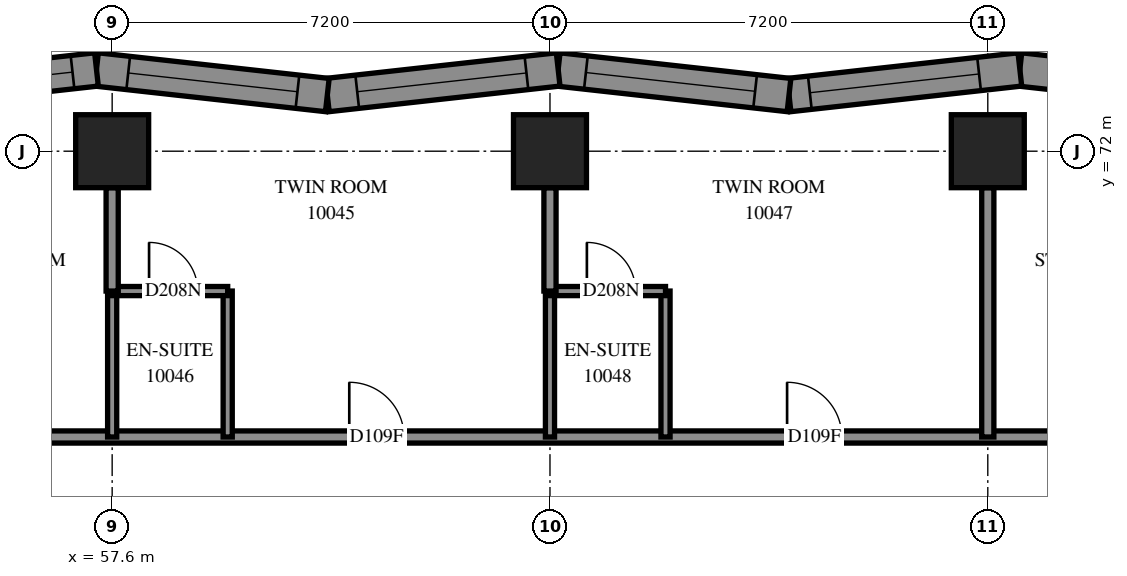
"""IFC4 building model, lengths in metres.
Left out: names, types, materials, properties, quantities, classifications, styles, units other than length and angle.
Written with IfcOpenShell. Run it as: python <this file> out.ifc"""

import sys

from ifc_helpers import new_model, si_unit, direction, frame, frame_2d, origin, origin_2d, place, context, subcontext, project, spatial, polyline, rectangle, outline, extrude, element, fill, save


model = new_model("IFC4")
c1 = context("Model", 3, precision=1e-05, world=origin(), true_north=direction((0.0, 1.0)))
c2 = subcontext(c1, "Body", "Model", "MODEL_VIEW")
j1 = project(units=[si_unit("LENGTHUNIT", "METRE"), si_unit("PLANEANGLEUNIT", "RADIAN")], contexts=[c1])
p1 = place(None, origin())
s1 = spatial("IfcSite", under=j1, at=p1, CompositionType="ELEMENT")
p2 = place(p1, origin())
s2 = spatial("IfcBuilding", under=s1, at=p2, CompositionType="ELEMENT")
p3 = place(p2, frame((0.0, 0.0, 40.6)))
s3 = spatial("IfcBuildingStorey", under=s2, at=p3, CompositionType="ELEMENT", Elevation=40.6)
for number, where, z_axis, x_axis in (
    (1, (57.6, 72.0, 0.0), (0.0, 0.0, 1.0), (1.0, 0.0, 0.0)),
    (2, (64.8, 72.0, 0.0), (0.0, 0.0, 1.0), (1.0, 0.0, 0.0)),
    (3, (72.0, 72.0, 0.0), (0.0, 0.0, 1.0), (1.0, 0.0, 0.0)),
):
    element("IfcColumn", number, at=place(p3, frame(where, z_axis=z_axis, x_axis=x_axis)), inside=s3, PredefinedType="COLUMN", context=c2, shape_type="SweptSolid", body=[
        extrude(rectangle(XDim=1.2, YDim=1.2, at=origin_2d()), origin(), (0.0, 0.0, 1.0), 3.1),
    ])
p4 = place(p3, frame((76.345, 72.921, 0.0), z_axis=(0.0, 0.0, 1.0), x_axis=(-0.9939087915, 0.1102057815, 0.0)))
e4 = element("IfcWall", 4, at=p4, inside=s3, PredefinedType="SOLIDWALL", context=c2, shape_type="SweptSolid", body=[
    extrude(outline(polyline([(0.052, -0.275), (3.872, -0.275), (3.811, 0.275), (-0.052, 0.275), (0.052, -0.275)])), origin(), (0.0, 0.0, 1.0), 3.1),
])
p5 = place(p4, frame((1.58, 0.0, 0.5)))
e5 = element("IfcOpeningElement", 5, at=p5, cuts=e4, PredefinedType="OPENING", context=c2, shape_type="SweptSolid", body=[
    extrude(rectangle(XDim=1.2, YDim=2.45, at=frame_2d((0.6, 1.225))), frame((0.0, 0.285, 0.0), z_axis=(0.0, -1.0, 0.0), x_axis=(1.0, 0.0, 0.0)), (0.0, 0.0, 1.0), 0.57),
])
p6 = place(p3, frame((72.527, 73.344, 0.0), z_axis=(0.0, 0.0, 1.0), x_axis=(-0.99390702, -0.1102217568, 0.0)))
e6 = element("IfcWall", 6, at=p6, inside=s3, PredefinedType="SOLIDWALL", context=c2, shape_type="SweptSolid", body=[
    extrude(outline(polyline([(-0.03, -0.275), (3.789, -0.275), (3.85, 0.275), (0.03, 0.275), (-0.03, -0.275)])), origin(), (0.0, 0.0, 1.0), 3.1),
])
p7 = place(p6, frame((0.675, 0.0, 0.5)))
e7 = element("IfcOpeningElement", 7, at=p7, cuts=e6, PredefinedType="OPENING", context=c2, shape_type="SweptSolid", body=[
    extrude(rectangle(XDim=2.8, YDim=2.45, at=frame_2d((1.4, 1.225))), frame((0.0, 0.285, 0.0), z_axis=(0.0, -1.0, 0.0), x_axis=(1.0, 0.0, 0.0)), (0.0, 0.0, 1.0), 0.57),
])
p8 = place(p3, frame((68.731, 72.923, 0.0), z_axis=(0.0, 0.0, 1.0), x_axis=(-0.99390702, 0.1102217568, 0.0)))
e8 = element("IfcWall", 8, at=p8, inside=s3, PredefinedType="SOLIDWALL", context=c2, shape_type="SweptSolid", body=[
    extrude(outline(polyline([(0.03, -0.275), (3.85, -0.275), (3.789, 0.275), (-0.03, 0.275), (0.03, -0.275)])), origin(), (0.0, 0.0, 1.0), 3.1),
])
p9 = place(p8, frame((0.561, 0.0, 0.5)))
e9 = element("IfcOpeningElement", 9, at=p9, cuts=e8, PredefinedType="OPENING", context=c2, shape_type="SweptSolid", body=[
    extrude(rectangle(XDim=2.8, YDim=2.45, at=frame_2d((1.4, 1.225))), frame((0.0, 0.285, 0.0), z_axis=(0.0, -1.0, 0.0), x_axis=(1.0, 0.0, 0.0)), (0.0, 0.0, 1.0), 0.57),
])
p10 = place(p3, frame((64.935, 73.344, 0.0), z_axis=(0.0, 0.0, 1.0), x_axis=(-0.993907338, -0.1102188888, 0.0)))
e10 = element("IfcWall", 10, at=p10, inside=s3, PredefinedType="SOLIDWALL", context=c2, shape_type="SweptSolid", body=[
    extrude(outline(polyline([(-0.03, -0.275), (3.789, -0.275), (3.85, 0.275), (0.03, 0.275), (-0.03, -0.275)])), origin(), (0.0, 0.0, 1.0), 3.1),
])
p11 = place(p10, frame((0.525, 0.0, 0.5)))
e11 = element("IfcOpeningElement", 11, at=p11, cuts=e10, PredefinedType="OPENING", context=c2, shape_type="SweptSolid", body=[
    extrude(rectangle(XDim=2.8, YDim=2.45, at=frame_2d((1.4, 1.225))), frame((0.0, 0.285, 0.0), z_axis=(0.0, -1.0, 0.0), x_axis=(1.0, 0.0, 0.0)), (0.0, 0.0, 1.0), 0.57),
])
p12 = place(p3, frame((61.138, 72.923, 0.0), z_axis=(0.0, 0.0, 1.0), x_axis=(-0.99390702, 0.1102217568, 0.0)))
e12 = element("IfcWall", 12, at=p12, inside=s3, PredefinedType="SOLIDWALL", context=c2, shape_type="SweptSolid", body=[
    extrude(outline(polyline([(0.03, -0.275), (3.85, -0.275), (3.789, 0.275), (-0.03, 0.275), (0.03, -0.275)])), origin(), (0.0, 0.0, 1.0), 3.1),
])
p13 = place(p12, frame((0.494, 0.0, 0.5)))
e13 = element("IfcOpeningElement", 13, at=p13, cuts=e12, PredefinedType="OPENING", context=c2, shape_type="SweptSolid", body=[
    extrude(rectangle(XDim=2.8, YDim=2.45, at=frame_2d((1.4, 1.225))), frame((0.0, 0.285, 0.0), z_axis=(0.0, -1.0, 0.0), x_axis=(1.0, 0.0, 0.0)), (0.0, 0.0, 1.0), 0.57),
])
p14 = place(p3, frame((57.342, 73.344, 0.0), z_axis=(0.0, 0.0, 1.0), x_axis=(-0.99390702, -0.1102217568, 0.0)))
e14 = element("IfcWall", 14, at=p14, inside=s3, PredefinedType="SOLIDWALL", context=c2, shape_type="SweptSolid", body=[
    extrude(outline(polyline([(-0.03, -0.275), (3.789, -0.275), (3.85, 0.275), (0.03, 0.275), (-0.03, -0.275)])), origin(), (0.0, 0.0, 1.0), 3.1),
])
p15 = place(p14, frame((0.397, 0.0, 0.5)))
e15 = element("IfcOpeningElement", 15, at=p15, cuts=e14, PredefinedType="OPENING", context=c2, shape_type="SweptSolid", body=[
    extrude(rectangle(XDim=2.8, YDim=2.45, at=frame_2d((1.4, 1.225))), frame((0.0, 0.285, 0.0), z_axis=(0.0, -1.0, 0.0), x_axis=(1.0, 0.0, 0.0)), (0.0, 0.0, 1.0), 0.57),
])
p16 = place(p3, frame((55.1, 67.3, 0.0), z_axis=(0.0, 0.0, 1.0), x_axis=(1.0, 0.0, 0.0)))
e16 = element("IfcWall", 16, at=p16, inside=s3, PredefinedType="PARTITIONING", context=c2, shape_type="SweptSolid", body=[
    extrude(rectangle(XDim=19.4, YDim=0.2, at=frame_2d((9.7, 0.0))), origin(), (0.0, 0.0, 1.0), 3.1),
])
p17 = place(p16, frame((6.399, 0.0, 0.0)))
e17 = element("IfcOpeningElement", 17, at=p17, cuts=e16, PredefinedType="OPENING", context=c2, shape_type="SweptSolid", body=[
    extrude(rectangle(XDim=0.9, YDim=2.1, at=frame_2d((0.45, 1.05))), frame((0.0, 0.11, 0.0), z_axis=(0.0, -1.0, 0.0), x_axis=(1.0, 0.0, 0.0)), (0.0, 0.0, 1.0), 0.22),
])
p18 = place(p16, frame((13.599, 0.0, 0.0)))
e18 = element("IfcOpeningElement", 18, at=p18, cuts=e16, PredefinedType="OPENING", context=c2, shape_type="SweptSolid", body=[
    extrude(rectangle(XDim=0.9, YDim=2.1, at=frame_2d((0.45, 1.05))), frame((0.0, 0.11, 0.0), z_axis=(0.0, -1.0, 0.0), x_axis=(1.0, 0.0, 0.0)), (0.0, 0.0, 1.0), 0.22),
])
p19 = place(p3, frame((72.0, 67.3, 0.0), z_axis=(0.0, 0.0, 1.0), x_axis=(0.0, 1.0, 0.0)))
e19 = element("IfcWall", 19, at=p19, inside=s3, PredefinedType="PARTITIONING", context=c2, shape_type="SweptSolid", body=[
    extrude(rectangle(XDim=4.1, YDim=0.2, at=frame_2d((2.05, 0.0))), origin(), (0.0, 0.0, 1.0), 3.1),
])
for number, where, z_axis, x_axis in (
    (20, (59.5, 67.3, 0.0), (0.0, 0.0, 1.0), (0.0, 1.0, 0.0)),
    (21, (57.6, 67.3, 0.0), (0.0, 0.0, 1.0), (0.0, 1.0, 0.0)),
    (22, (66.7, 67.3, 0.0), (0.0, 0.0, 1.0), (0.0, 1.0, 0.0)),
    (23, (64.8, 67.3, 0.0), (0.0, 0.0, 1.0), (0.0, 1.0, 0.0)),
):
    element("IfcWall", number, at=place(p3, frame(where, z_axis=z_axis, x_axis=x_axis)), inside=s3, PredefinedType="PARTITIONING", context=c2, shape_type="SweptSolid", body=[
        extrude(rectangle(XDim=2.4, YDim=0.15, at=frame_2d((1.2, 0.0))), origin(), (0.0, 0.0, 1.0), 3.1),
    ])
p20 = place(p3, frame((64.8, 69.7, 0.0), z_axis=(0.0, 0.0, 1.0), x_axis=(1.0, 0.0, 0.0)))
e24 = element("IfcWall", 24, at=p20, inside=s3, PredefinedType="PARTITIONING", context=c2, shape_type="SweptSolid", body=[
    extrude(rectangle(XDim=1.9, YDim=0.15, at=frame_2d((0.95, 0.0))), origin(), (0.0, 0.0, 1.0), 3.1),
])
p21 = place(p20, frame((0.607, 0.0, 0.0)))
e25 = element("IfcOpeningElement", 25, at=p21, cuts=e24, PredefinedType="OPENING", context=c2, shape_type="SweptSolid", body=[
    extrude(rectangle(XDim=0.8, YDim=2.1, at=frame_2d((0.4, 1.05))), frame((0.0, 0.085, 0.0), z_axis=(0.0, -1.0, 0.0), x_axis=(1.0, 0.0, 0.0)), (0.0, 0.0, 1.0), 0.17),
])
p22 = place(p3, frame((57.6, 69.7, 0.0), z_axis=(0.0, 0.0, 1.0), x_axis=(1.0, 0.0, 0.0)))
e26 = element("IfcWall", 26, at=p22, inside=s3, PredefinedType="PARTITIONING", context=c2, shape_type="SweptSolid", body=[
    extrude(rectangle(XDim=1.9, YDim=0.15, at=frame_2d((0.95, 0.0))), origin(), (0.0, 0.0, 1.0), 3.1),
])
p23 = place(p22, frame((0.607, 0.0, 0.0)))
e27 = element("IfcOpeningElement", 27, at=p23, cuts=e26, PredefinedType="OPENING", context=c2, shape_type="SweptSolid", body=[
    extrude(rectangle(XDim=0.8, YDim=2.1, at=frame_2d((0.4, 1.05))), frame((0.0, 0.085, 0.0), z_axis=(0.0, -1.0, 0.0), x_axis=(1.0, 0.0, 0.0)), (0.0, 0.0, 1.0), 0.17),
])
for number, where, z_axis, x_axis in (
    (28, (57.6, 69.7, 0.0), (0.0, 0.0, 1.0), (0.0, 1.0, 0.0)),
    (29, (64.8, 69.7, 0.0), (0.0, 0.0, 1.0), (0.0, 1.0, 0.0)),
):
    element("IfcWall", number, at=place(p3, frame(where, z_axis=z_axis, x_axis=x_axis)), inside=s3, PredefinedType="PARTITIONING", context=c2, shape_type="SweptSolid", body=[
        extrude(rectangle(XDim=1.7, YDim=0.2, at=frame_2d((0.85, 0.0))), origin(), (0.0, 0.0, 1.0), 3.1),
    ])
p24 = place(p7, origin())
e30 = element("IfcWindow", 30, at=p24, inside=s3, PartitioningType="SINGLE_PANEL", PredefinedType="WINDOW", context=c2, shape_type="SweptSolid", body=[
    extrude(rectangle(XDim=2.8, YDim=2.45, at=frame_2d((1.4, 1.225))), frame((0.0, 0.155, 0.0), z_axis=(0.0, -1.0, 0.0), x_axis=(1.0, 0.0, 0.0)), (0.0, 0.0, 1.0), 0.06),
])
fill(e7, e30)
p25 = place(p9, origin())
e31 = element("IfcWindow", 31, at=p25, inside=s3, PartitioningType="SINGLE_PANEL", PredefinedType="WINDOW", context=c2, shape_type="SweptSolid", body=[
    extrude(rectangle(XDim=2.8, YDim=2.45, at=frame_2d((1.4, 1.225))), frame((0.0, 0.155, 0.0), z_axis=(0.0, -1.0, 0.0), x_axis=(1.0, 0.0, 0.0)), (0.0, 0.0, 1.0), 0.06),
])
fill(e9, e31)
p26 = place(p11, origin())
e32 = element("IfcWindow", 32, at=p26, inside=s3, PartitioningType="SINGLE_PANEL", PredefinedType="WINDOW", context=c2, shape_type="SweptSolid", body=[
    extrude(rectangle(XDim=2.8, YDim=2.45, at=frame_2d((1.4, 1.225))), frame((0.0, 0.155, 0.0), z_axis=(0.0, -1.0, 0.0), x_axis=(1.0, 0.0, 0.0)), (0.0, 0.0, 1.0), 0.06),
])
fill(e11, e32)
p27 = place(p13, origin())
e33 = element("IfcWindow", 33, at=p27, inside=s3, PartitioningType="SINGLE_PANEL", PredefinedType="WINDOW", context=c2, shape_type="SweptSolid", body=[
    extrude(rectangle(XDim=2.8, YDim=2.45, at=frame_2d((1.4, 1.225))), frame((0.0, 0.155, 0.0), z_axis=(0.0, -1.0, 0.0), x_axis=(1.0, 0.0, 0.0)), (0.0, 0.0, 1.0), 0.06),
])
fill(e13, e33)
p28 = place(p15, origin())
e34 = element("IfcWindow", 34, at=p28, inside=s3, PartitioningType="SINGLE_PANEL", PredefinedType="WINDOW", context=c2, shape_type="SweptSolid", body=[
    extrude(rectangle(XDim=2.8, YDim=2.45, at=frame_2d((1.4, 1.225))), frame((0.0, 0.155, 0.0), z_axis=(0.0, -1.0, 0.0), x_axis=(1.0, 0.0, 0.0)), (0.0, 0.0, 1.0), 0.06),
])
fill(e15, e34)
p29 = place(p17, origin())
e35 = element("IfcDoor", 35, at=p29, inside=s3, OperationType="SINGLE_SWING_RIGHT", PredefinedType="DOOR", context=c2, shape_type="SweptSolid", body=[
    extrude(rectangle(XDim=0.9, YDim=2.1, at=frame_2d((0.45, 1.05))), frame((0.0, 0.025, 0.0), z_axis=(0.0, -1.0, 0.0), x_axis=(1.0, 0.0, 0.0)), (0.0, 0.0, 1.0), 0.05),
])
fill(e17, e35)
p30 = place(p23, origin())
e36 = element("IfcDoor", 36, at=p30, inside=s3, OperationType="SINGLE_SWING_RIGHT", PredefinedType="DOOR", context=c2, shape_type="SweptSolid", body=[
    extrude(rectangle(XDim=0.8, YDim=2.1, at=frame_2d((0.4, 1.05))), frame((0.0, 0.025, 0.0), z_axis=(0.0, -1.0, 0.0), x_axis=(1.0, 0.0, 0.0)), (0.0, 0.0, 1.0), 0.05),
])
fill(e27, e36)
p31 = place(p18, origin())
e37 = element("IfcDoor", 37, at=p31, inside=s3, OperationType="SINGLE_SWING_RIGHT", PredefinedType="DOOR", context=c2, shape_type="SweptSolid", body=[
    extrude(rectangle(XDim=0.9, YDim=2.1, at=frame_2d((0.45, 1.05))), frame((0.0, 0.025, 0.0), z_axis=(0.0, -1.0, 0.0), x_axis=(1.0, 0.0, 0.0)), (0.0, 0.0, 1.0), 0.05),
])
fill(e18, e37)
p32 = place(p21, origin())
e38 = element("IfcDoor", 38, at=p32, inside=s3, OperationType="SINGLE_SWING_RIGHT", PredefinedType="DOOR", context=c2, shape_type="SweptSolid", body=[
    extrude(rectangle(XDim=0.8, YDim=2.1, at=frame_2d((0.4, 1.05))), frame((0.0, 0.025, 0.0), z_axis=(0.0, -1.0, 0.0), x_axis=(1.0, 0.0, 0.0)), (0.0, 0.0, 1.0), 0.05),
])
fill(e25, e38)
save(model, sys.argv[1])
